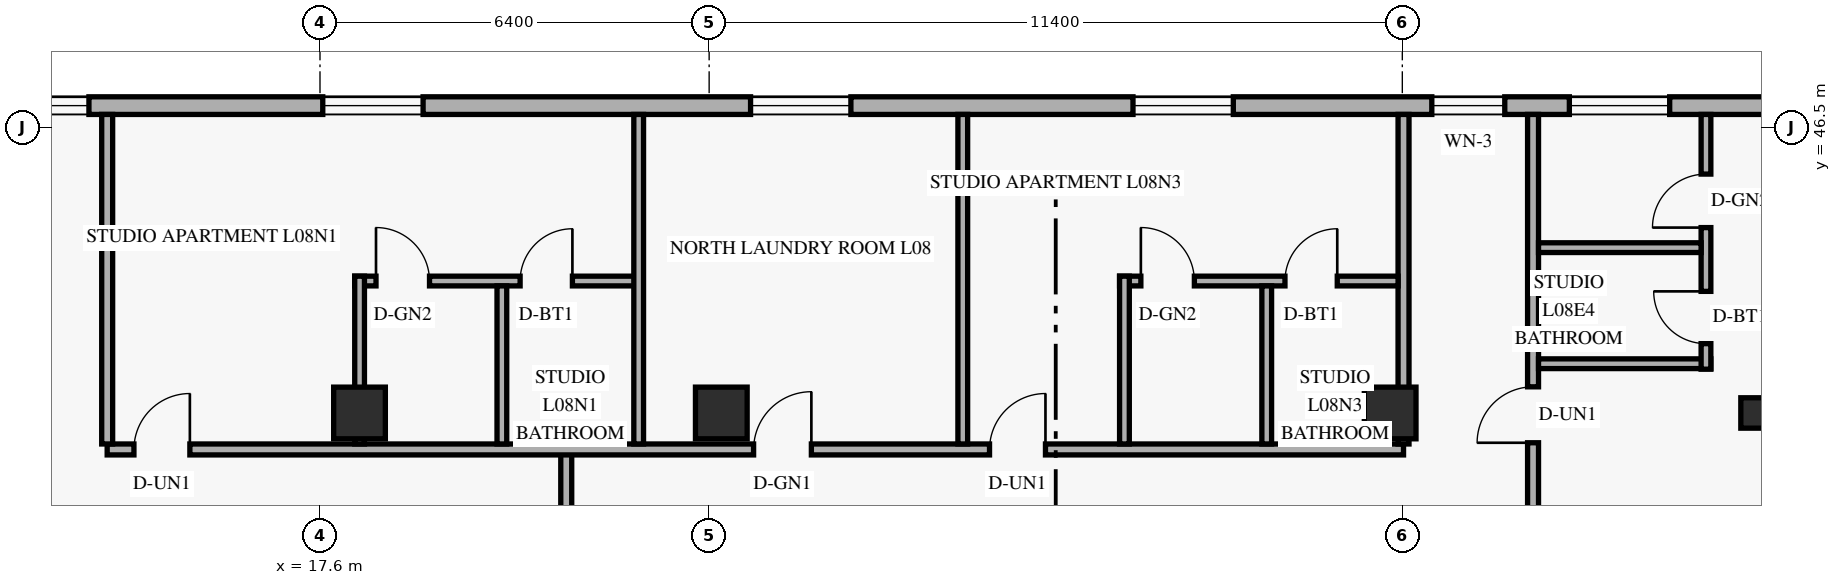
"""IFC4 building model, lengths in metres.
Left out: names, types, materials, properties, quantities, classifications, styles, units other than length and angle.
Written with IfcOpenShell. Run it as: python <this file> out.ifc"""

import sys

from ifc_helpers import new_model, si_unit, direction, frame, frame_2d, origin, origin_2d, place, context, subcontext, project, spatial, rectangle, hollow_rectangle, extrude, element, fill, save


model = new_model("IFC4")
c1 = context("Model", 3, precision=1e-05, world=origin(), true_north=direction((0.0, 1.0)))
c2 = subcontext(c1, "Body", "Model", "MODEL_VIEW")
j1 = project(units=[si_unit("LENGTHUNIT", "METRE"), si_unit("PLANEANGLEUNIT", "RADIAN")], contexts=[c1])
p1 = place(None, origin())
s1 = spatial("IfcSite", under=j1, at=p1, CompositionType="ELEMENT")
p2 = place(p1, origin())
s2 = spatial("IfcBuilding", under=s1, at=p2, CompositionType="ELEMENT")
p3 = place(p2, frame((0.0, 0.0, 34.8)))
s3 = spatial("IfcBuildingStorey", under=s2, at=p3, CompositionType="ELEMENT", Elevation=34.8)
for number, where, z_axis, x_axis in (
    (1, (18.25, 41.8, 0.0), (0.0, 0.0, 1.0), (1.0, 0.0, 0.0)),
    (2, (24.2, 41.8, 0.0), (0.0, 0.0, 1.0), (1.0, 0.0, 0.0)),
    (3, (35.2, 41.8, 0.0), (0.0, 0.0, 1.0), (1.0, 0.0, 0.0)),
):
    element("IfcColumn", number, at=place(p3, frame(where, z_axis=z_axis, x_axis=x_axis)), inside=s3, PredefinedType="COLUMN", context=c2, shape_type="SweptSolid", body=[
        extrude(rectangle(XDim=0.85, YDim=0.85, at=origin_2d()), origin(), (0.0, 0.0, 1.0), 3.6),
    ])
p4 = place(p3, frame((41.154, 41.8, 0.0), z_axis=(0.034973505036, 0.0, 0.999388239847), x_axis=(0.0, 1.0, 0.0)))
e4 = element("IfcColumn", 4, at=p4, inside=s3, PredefinedType="COLUMN", context=c2, shape_type="SweptSolid", body=[
    extrude(hollow_rectangle(XDim=0.5, YDim=0.5, WallThickness=0.022, at=origin_2d()), origin(), (0.0, 0.0, 1.0), 3.602),
])
p5 = place(p3, frame((44.98, 46.855, 0.0), z_axis=(0.0, 0.0, 1.0), x_axis=(-1.0, 0.0, 0.0)))
e5 = element("IfcWall", 5, at=p5, inside=s3, PredefinedType="SOLIDWALL", context=c2, shape_type="SweptSolid", body=[
    extrude(rectangle(XDim=39.56, YDim=0.29, at=frame_2d((19.78, 0.0))), origin(), (0.0, 0.0, 1.0), 3.36),
])
p6 = place(p5, frame((35.295, 0.0, 0.85)))
e6 = element("IfcOpeningElement", 6, at=p6, cuts=e5, PredefinedType="OPENING", context=c2, shape_type="SweptSolid", body=[
    extrude(rectangle(XDim=1.65, YDim=1.6, at=frame_2d((0.825, 0.8))), frame((0.0, 0.155, 0.0), z_axis=(0.0, -1.0, 0.0), x_axis=(1.0, 0.0, 0.0)), (0.0, 0.0, 1.0), 0.31),
])
p7 = place(p5, frame((31.18, 0.0, 0.85)))
e7 = element("IfcOpeningElement", 7, at=p7, cuts=e5, PredefinedType="OPENING", context=c2, shape_type="SweptSolid", body=[
    extrude(rectangle(XDim=1.2, YDim=1.5, at=frame_2d((0.6, 0.75))), frame((0.0, 0.155, 0.0), z_axis=(0.0, -1.0, 0.0), x_axis=(1.0, 0.0, 0.0)), (0.0, 0.0, 1.0), 0.31),
])
p8 = place(p5, frame((25.684, 0.0, 0.85)))
e8 = element("IfcOpeningElement", 8, at=p8, cuts=e5, PredefinedType="OPENING", context=c2, shape_type="SweptSolid", body=[
    extrude(rectangle(XDim=1.65, YDim=1.6, at=frame_2d((0.825, 0.8))), frame((0.0, 0.155, 0.0), z_axis=(0.0, -1.0, 0.0), x_axis=(1.0, 0.0, 0.0)), (0.0, 0.0, 1.0), 0.31),
])
p9 = place(p5, frame((18.649, 0.0, 0.85)))
e9 = element("IfcOpeningElement", 9, at=p9, cuts=e5, PredefinedType="OPENING", context=c2, shape_type="SweptSolid", body=[
    extrude(rectangle(XDim=1.65, YDim=1.6, at=frame_2d((0.825, 0.8))), frame((0.0, 0.155, 0.0), z_axis=(0.0, -1.0, 0.0), x_axis=(1.0, 0.0, 0.0)), (0.0, 0.0, 1.0), 0.31),
])
p10 = place(p5, frame((12.359, 0.0, 0.85)))
e10 = element("IfcOpeningElement", 10, at=p10, cuts=e5, PredefinedType="OPENING", context=c2, shape_type="SweptSolid", body=[
    extrude(rectangle(XDim=1.65, YDim=1.6, at=frame_2d((0.825, 0.8))), frame((0.0, 0.155, 0.0), z_axis=(0.0, -1.0, 0.0), x_axis=(1.0, 0.0, 0.0)), (0.0, 0.0, 1.0), 0.31),
])
p11 = place(p5, frame((7.895, 0.0, 0.85)))
e11 = element("IfcOpeningElement", 11, at=p11, cuts=e5, PredefinedType="OPENING", context=c2, shape_type="SweptSolid", body=[
    extrude(rectangle(XDim=1.2, YDim=1.5, at=frame_2d((0.6, 0.75))), frame((0.0, 0.155, 0.0), z_axis=(0.0, -1.0, 0.0), x_axis=(1.0, 0.0, 0.0)), (0.0, 0.0, 1.0), 0.31),
])
p12 = place(p5, frame((5.183, 0.0, 0.85)))
e12 = element("IfcOpeningElement", 12, at=p12, cuts=e5, PredefinedType="OPENING", context=c2, shape_type="SweptSolid", body=[
    extrude(rectangle(XDim=1.65, YDim=1.6, at=frame_2d((0.825, 0.8))), frame((0.0, 0.155, 0.0), z_axis=(0.0, -1.0, 0.0), x_axis=(1.0, 0.0, 0.0)), (0.0, 0.0, 1.0), 0.31),
])
p13 = place(p5, frame((1.468, 0.0, 0.85)))
e13 = element("IfcOpeningElement", 13, at=p13, cuts=e5, PredefinedType="OPENING", context=c2, shape_type="SweptSolid", body=[
    extrude(rectangle(XDim=1.65, YDim=1.6, at=frame_2d((0.825, 0.8))), frame((0.0, 0.155, 0.0), z_axis=(0.0, -1.0, 0.0), x_axis=(1.0, 0.0, 0.0)), (0.0, 0.0, 1.0), 0.31),
])
p14 = place(p3, frame((37.55, 1.29, 0.0), z_axis=(0.0, 0.0, 1.0), x_axis=(0.0, 1.0, 0.0)))
e14 = element("IfcWall", 14, at=p14, inside=s3, PredefinedType="STANDARD", context=c2, shape_type="SweptSolid", body=[
    extrude(rectangle(XDim=45.42, YDim=0.18, at=frame_2d((22.71, 0.0))), origin(), (0.0, 0.0, 1.0), 2.649),
])
p15 = place(p14, frame((4.46, 0.0, 0.0)))
e15 = element("IfcOpeningElement", 15, at=p15, cuts=e14, PredefinedType="OPENING", context=c2, shape_type="SweptSolid", body=[
    extrude(rectangle(XDim=0.92, YDim=2.15, at=frame_2d((0.46, 1.075))), frame((0.0, 0.1, 0.0), z_axis=(0.0, -1.0, 0.0), x_axis=(1.0, 0.0, 0.0)), (0.0, 0.0, 1.0), 0.2),
])
p16 = place(p14, frame((15.907, 0.0, 0.0)))
e16 = element("IfcOpeningElement", 16, at=p16, cuts=e14, PredefinedType="OPENING", context=c2, shape_type="SweptSolid", body=[
    extrude(rectangle(XDim=0.92, YDim=2.15, at=frame_2d((0.46, 1.075))), frame((0.0, 0.1, 0.0), z_axis=(0.0, -1.0, 0.0), x_axis=(1.0, 0.0, 0.0)), (0.0, 0.0, 1.0), 0.2),
])
p17 = place(p14, frame((28.23, 0.0, 0.0)))
e17 = element("IfcOpeningElement", 17, at=p17, cuts=e14, PredefinedType="OPENING", context=c2, shape_type="SweptSolid", body=[
    extrude(rectangle(XDim=0.92, YDim=2.15, at=frame_2d((0.46, 1.075))), frame((0.0, 0.1, 0.0), z_axis=(0.0, -1.0, 0.0), x_axis=(1.0, 0.0, 0.0)), (0.0, 0.0, 1.0), 0.2),
])
p18 = place(p14, frame((40.02, 0.0, 0.0)))
e18 = element("IfcOpeningElement", 18, at=p18, cuts=e14, PredefinedType="OPENING", context=c2, shape_type="SweptSolid", body=[
    extrude(rectangle(XDim=0.92, YDim=2.15, at=frame_2d((0.46, 1.075))), frame((0.0, 0.1, 0.0), z_axis=(0.0, -1.0, 0.0), x_axis=(1.0, 0.0, 0.0)), (0.0, 0.0, 1.0), 0.2),
])
p19 = place(p3, frame((21.65, 6.8, 0.0), z_axis=(0.0, 0.0, 1.0), x_axis=(0.0, 1.0, 0.0)))
e19 = element("IfcWall", 19, at=p19, inside=s3, PredefinedType="STANDARD", context=c2, shape_type="SweptSolid", body=[
    extrude(rectangle(XDim=34.4, YDim=0.18, at=frame_2d((17.2, 0.0))), origin(), (0.0, 0.0, 1.0), 2.649),
])
p20 = place(p3, frame((14.1, 41.2, 0.0), z_axis=(0.0, 0.0, 1.0), x_axis=(1.0, 0.0, 0.0)))
e20 = element("IfcWall", 20, at=p20, inside=s3, PredefinedType="STANDARD", context=c2, shape_type="SweptSolid", body=[
    extrude(rectangle(XDim=21.32, YDim=0.18, at=frame_2d((10.66, 0.0))), origin(), (0.0, 0.0, 1.0), 2.649),
])
p21 = place(p20, frame((0.44, 0.0, 0.0)))
e21 = element("IfcOpeningElement", 21, at=p21, cuts=e20, PredefinedType="OPENING", context=c2, shape_type="SweptSolid", body=[
    extrude(rectangle(XDim=0.92, YDim=2.15, at=frame_2d((0.46, 1.075))), frame((0.0, 0.1, 0.0), z_axis=(0.0, -1.0, 0.0), x_axis=(1.0, 0.0, 0.0)), (0.0, 0.0, 1.0), 0.2),
])
p22 = place(p20, frame((10.631, 0.0, 0.0)))
e22 = element("IfcOpeningElement", 22, at=p22, cuts=e20, PredefinedType="OPENING", context=c2, shape_type="SweptSolid", body=[
    extrude(rectangle(XDim=0.95, YDim=2.15, at=frame_2d((0.475, 1.075))), frame((0.0, 0.1, 0.0), z_axis=(0.0, -1.0, 0.0), x_axis=(1.0, 0.0, 0.0)), (0.0, 0.0, 1.0), 0.2),
])
p23 = place(p20, frame((14.511, 0.0, 0.0)))
e23 = element("IfcOpeningElement", 23, at=p23, cuts=e20, PredefinedType="OPENING", context=c2, shape_type="SweptSolid", body=[
    extrude(rectangle(XDim=0.92, YDim=2.15, at=frame_2d((0.46, 1.075))), frame((0.0, 0.1, 0.0), z_axis=(0.0, -1.0, 0.0), x_axis=(1.0, 0.0, 0.0)), (0.0, 0.0, 1.0), 0.2),
])
p24 = place(p3, frame((35.42, 41.29, 0.0), z_axis=(0.0, 0.0, 1.0), x_axis=(0.0, 1.0, 0.0)))
e24 = element("IfcWall", 24, at=p24, inside=s3, PredefinedType="PARTITIONING", context=c2, shape_type="SweptSolid", body=[
    extrude(rectangle(XDim=5.42, YDim=0.18, at=frame_2d((2.71, 0.0))), origin(), (0.0, 0.0, 1.0), 3.36),
])
p25 = place(p3, frame((14.1, 41.29, 0.0), z_axis=(0.0, 0.0, 1.0), x_axis=(0.0, 1.0, 0.0)))
e25 = element("IfcWall", 25, at=p25, inside=s3, PredefinedType="PARTITIONING", context=c2, shape_type="SweptSolid", body=[
    extrude(rectangle(XDim=5.42, YDim=0.18, at=frame_2d((2.71, 0.0))), origin(), (0.0, 0.0, 1.0), 2.809),
])
p26 = place(p3, frame((37.64, 42.61, 0.0), z_axis=(0.0, 0.0, 1.0), x_axis=(1.0, 0.0, 0.0)))
e26 = element("IfcWall", 26, at=p26, inside=s3, PredefinedType="PLUMBINGWALL", context=c2, shape_type="SweptSolid", body=[
    extrude(rectangle(XDim=2.834, YDim=0.16, at=frame_2d((1.417, 0.0))), origin(), (0.0, 0.0, 1.0), 3.36),
])
p27 = place(p3, frame((40.394, 42.52, 0.0), z_axis=(0.0, 0.0, 1.0), x_axis=(0.0, 1.0, 0.0)))
e27 = element("IfcWall", 27, at=p27, inside=s3, PredefinedType="PLUMBINGWALL", context=c2, shape_type="SweptSolid", body=[
    extrude(rectangle(XDim=4.19, YDim=0.16, at=frame_2d((2.095, 0.0))), origin(), (0.0, 0.0, 1.0), 3.36),
])
p28 = place(p27, frame((0.42, 0.0, 0.0)))
e28 = element("IfcOpeningElement", 28, at=p28, cuts=e27, PredefinedType="OPENING", context=c2, shape_type="SweptSolid", body=[
    extrude(rectangle(XDim=0.86, YDim=2.12, at=frame_2d((0.43, 1.06))), frame((0.0, 0.09, 0.0), z_axis=(0.0, -1.0, 0.0), x_axis=(1.0, 0.0, 0.0)), (0.0, 0.0, 1.0), 0.18),
])
p29 = place(p27, frame((2.329, 0.0, 0.0)))
e29 = element("IfcOpeningElement", 29, at=p29, cuts=e27, PredefinedType="OPENING", context=c2, shape_type="SweptSolid", body=[
    extrude(rectangle(XDim=0.88, YDim=2.12, at=frame_2d((0.44, 1.06))), frame((0.0, 0.09, 0.0), z_axis=(0.0, -1.0, 0.0), x_axis=(1.0, 0.0, 0.0)), (0.0, 0.0, 1.0), 0.18),
])
p30 = place(p3, frame((37.64, 44.519, 0.0), z_axis=(0.0, 0.0, 1.0), x_axis=(1.0, 0.0, 0.0)))
e30 = element("IfcWall", 30, at=p30, inside=s3, PredefinedType="PLUMBINGWALL", context=c2, shape_type="SweptSolid", body=[
    extrude(rectangle(XDim=2.674, YDim=0.16, at=frame_2d((1.337, 0.0))), origin(), (0.0, 0.0, 1.0), 3.36),
])
p31 = place(p3, frame((18.171, 43.97, 0.0), z_axis=(0.0, 0.0, 1.0), x_axis=(1.0, 0.0, 0.0)))
e31 = element("IfcWall", 31, at=p31, inside=s3, PredefinedType="PLUMBINGWALL", context=c2, shape_type="SweptSolid", body=[
    extrude(rectangle(XDim=4.67, YDim=0.16, at=frame_2d((2.335, 0.0))), origin(), (0.0, 0.0, 1.0), 3.36),
])
p32 = place(p31, frame((0.35, 0.0, 0.0)))
e32 = element("IfcOpeningElement", 32, at=p32, cuts=e31, PredefinedType="OPENING", context=c2, shape_type="SweptSolid", body=[
    extrude(rectangle(XDim=0.88, YDim=2.12, at=frame_2d((0.44, 1.06))), frame((0.0, 0.09, 0.0), z_axis=(0.0, -1.0, 0.0), x_axis=(1.0, 0.0, 0.0)), (0.0, 0.0, 1.0), 0.18),
])
p33 = place(p31, frame((2.72, 0.0, 0.0)))
e33 = element("IfcOpeningElement", 33, at=p33, cuts=e31, PredefinedType="OPENING", context=c2, shape_type="SweptSolid", body=[
    extrude(rectangle(XDim=0.86, YDim=2.12, at=frame_2d((0.43, 1.06))), frame((0.0, 0.09, 0.0), z_axis=(0.0, -1.0, 0.0), x_axis=(1.0, 0.0, 0.0)), (0.0, 0.0, 1.0), 0.18),
])
p34 = place(p3, frame((18.251, 41.29, 0.0), z_axis=(0.0, 0.0, 1.0), x_axis=(0.0, 1.0, 0.0)))
e34 = element("IfcWall", 34, at=p34, inside=s3, PredefinedType="PLUMBINGWALL", context=c2, shape_type="SweptSolid", body=[
    extrude(rectangle(XDim=2.76, YDim=0.16, at=frame_2d((1.38, 0.0))), origin(), (0.0, 0.0, 1.0), 2.649),
])
p35 = place(p3, frame((20.591, 41.29, 0.0), z_axis=(0.0, 0.0, 1.0), x_axis=(0.0, 1.0, 0.0)))
e35 = element("IfcWall", 35, at=p35, inside=s3, PredefinedType="PLUMBINGWALL", context=c2, shape_type="SweptSolid", body=[
    extrude(rectangle(XDim=2.6, YDim=0.16, at=frame_2d((1.3, 0.0))), origin(), (0.0, 0.0, 1.0), 2.809),
])
for number, where, z_axis, x_axis in (
    (36, (22.841, 41.29, 0.0), (0.0, 0.0, 1.0), (0.0, 1.0, 0.0)),
    (37, (28.171, 41.29, 0.0), (0.0, 0.0, 1.0), (0.0, 1.0, 0.0)),
):
    element("IfcWall", number, at=place(p3, frame(where, z_axis=z_axis, x_axis=x_axis)), inside=s3, PredefinedType="PARTITIONING", context=c2, shape_type="SweptSolid", body=[
        extrude(rectangle(XDim=5.42, YDim=0.16, at=frame_2d((2.71, 0.0))), origin(), (0.0, 0.0, 1.0), 2.809),
    ])
p36 = place(p3, frame((30.75, 43.97, 0.0), z_axis=(0.0, 0.0, 1.0), x_axis=(1.0, 0.0, 0.0)))
e38 = element("IfcWall", 38, at=p36, inside=s3, PredefinedType="PLUMBINGWALL", context=c2, shape_type="SweptSolid", body=[
    extrude(rectangle(XDim=4.58, YDim=0.16, at=frame_2d((2.29, 0.0))), origin(), (0.0, 0.0, 1.0), 3.36),
])
p37 = place(p36, frame((0.35, 0.0, 0.0)))
e39 = element("IfcOpeningElement", 39, at=p37, cuts=e38, PredefinedType="OPENING", context=c2, shape_type="SweptSolid", body=[
    extrude(rectangle(XDim=0.88, YDim=2.12, at=frame_2d((0.44, 1.06))), frame((0.0, 0.09, 0.0), z_axis=(0.0, -1.0, 0.0), x_axis=(1.0, 0.0, 0.0)), (0.0, 0.0, 1.0), 0.18),
])
p38 = place(p36, frame((2.72, 0.0, 0.0)))
e40 = element("IfcOpeningElement", 40, at=p38, cuts=e38, PredefinedType="OPENING", context=c2, shape_type="SweptSolid", body=[
    extrude(rectangle(XDim=0.86, YDim=2.12, at=frame_2d((0.43, 1.06))), frame((0.0, 0.09, 0.0), z_axis=(0.0, -1.0, 0.0), x_axis=(1.0, 0.0, 0.0)), (0.0, 0.0, 1.0), 0.18),
])
p39 = place(p3, frame((30.83, 41.29, 0.0), z_axis=(0.0, 0.0, 1.0), x_axis=(0.0, 1.0, 0.0)))
e41 = element("IfcWall", 41, at=p39, inside=s3, PredefinedType="PLUMBINGWALL", context=c2, shape_type="SweptSolid", body=[
    extrude(rectangle(XDim=2.76, YDim=0.16, at=frame_2d((1.38, 0.0))), origin(), (0.0, 0.0, 1.0), 2.809),
])
p40 = place(p3, frame((33.17, 41.29, 0.0), z_axis=(0.0, 0.0, 1.0), x_axis=(0.0, 1.0, 0.0)))
e42 = element("IfcWall", 42, at=p40, inside=s3, PredefinedType="PLUMBINGWALL", context=c2, shape_type="SweptSolid", body=[
    extrude(rectangle(XDim=2.6, YDim=0.16, at=frame_2d((1.3, 0.0))), origin(), (0.0, 0.0, 1.0), 2.809),
])
p41 = place(p7, origin())
e43 = element("IfcWindow", 43, at=p41, inside=s3, PartitioningType="SINGLE_PANEL", PredefinedType="WINDOW", context=c2, shape_type="SweptSolid", body=[
    extrude(rectangle(XDim=1.2, YDim=1.5, at=frame_2d((0.6, 0.75))), frame((0.0, 0.03, 0.0), z_axis=(0.0, -1.0, 0.0), x_axis=(1.0, 0.0, 0.0)), (0.0, 0.0, 1.0), 0.06),
])
fill(e7, e43)
p42 = place(p8, origin())
e44 = element("IfcWindow", 44, at=p42, inside=s3, PartitioningType="SINGLE_PANEL", PredefinedType="WINDOW", context=c2, shape_type="SweptSolid", body=[
    extrude(rectangle(XDim=1.65, YDim=1.6, at=frame_2d((0.825, 0.8))), frame((0.0, 0.03, 0.0), z_axis=(0.0, -1.0, 0.0), x_axis=(1.0, 0.0, 0.0)), (0.0, 0.0, 1.0), 0.06),
])
fill(e8, e44)
p43 = place(p9, origin())
e45 = element("IfcWindow", 45, at=p43, inside=s3, PartitioningType="SINGLE_PANEL", PredefinedType="WINDOW", context=c2, shape_type="SweptSolid", body=[
    extrude(rectangle(XDim=1.65, YDim=1.6, at=frame_2d((0.825, 0.8))), frame((0.0, 0.03, 0.0), z_axis=(0.0, -1.0, 0.0), x_axis=(1.0, 0.0, 0.0)), (0.0, 0.0, 1.0), 0.06),
])
fill(e9, e45)
p44 = place(p10, origin())
e46 = element("IfcWindow", 46, at=p44, inside=s3, PartitioningType="SINGLE_PANEL", PredefinedType="WINDOW", context=c2, shape_type="SweptSolid", body=[
    extrude(rectangle(XDim=1.65, YDim=1.6, at=frame_2d((0.825, 0.8))), frame((0.0, 0.03, 0.0), z_axis=(0.0, -1.0, 0.0), x_axis=(1.0, 0.0, 0.0)), (0.0, 0.0, 1.0), 0.06),
])
fill(e10, e46)
p45 = place(p11, origin())
e47 = element("IfcWindow", 47, at=p45, inside=s3, PartitioningType="SINGLE_PANEL", PredefinedType="WINDOW", context=c2, shape_type="SweptSolid", body=[
    extrude(rectangle(XDim=1.2, YDim=1.5, at=frame_2d((0.6, 0.75))), frame((0.0, 0.03, 0.0), z_axis=(0.0, -1.0, 0.0), x_axis=(1.0, 0.0, 0.0)), (0.0, 0.0, 1.0), 0.06),
])
fill(e11, e47)
p46 = place(p12, origin())
e48 = element("IfcWindow", 48, at=p46, inside=s3, PartitioningType="SINGLE_PANEL", PredefinedType="WINDOW", context=c2, shape_type="SweptSolid", body=[
    extrude(rectangle(XDim=1.65, YDim=1.6, at=frame_2d((0.825, 0.8))), frame((0.0, 0.03, 0.0), z_axis=(0.0, -1.0, 0.0), x_axis=(1.0, 0.0, 0.0)), (0.0, 0.0, 1.0), 0.06),
])
fill(e12, e48)
p47 = place(p18, origin())
e49 = element("IfcDoor", 49, at=p47, inside=s3, OperationType="SINGLE_SWING_LEFT", PredefinedType="DOOR", context=c2, shape_type="SweptSolid", body=[
    extrude(rectangle(XDim=0.92, YDim=2.15, at=frame_2d((0.46, 1.075))), frame((0.0, 0.025, 0.0), z_axis=(0.0, -1.0, 0.0), x_axis=(1.0, 0.0, 0.0)), (0.0, 0.0, 1.0), 0.05),
])
fill(e18, e49)
p48 = place(p28, origin())
e50 = element("IfcDoor", 50, at=p48, inside=s3, OperationType="SINGLE_SWING_RIGHT", PredefinedType="DOOR", context=c2, shape_type="SweptSolid", body=[
    extrude(rectangle(XDim=0.86, YDim=2.12, at=frame_2d((0.43, 1.06))), frame((0.0, 0.025, 0.0), z_axis=(0.0, -1.0, 0.0), x_axis=(1.0, 0.0, 0.0)), (0.0, 0.0, 1.0), 0.05),
])
fill(e28, e50)
p49 = place(p29, origin())
e51 = element("IfcDoor", 51, at=p49, inside=s3, OperationType="SINGLE_SWING_LEFT", PredefinedType="DOOR", context=c2, shape_type="SweptSolid", body=[
    extrude(rectangle(XDim=0.88, YDim=2.12, at=frame_2d((0.44, 1.06))), frame((0.0, 0.025, 0.0), z_axis=(0.0, -1.0, 0.0), x_axis=(1.0, 0.0, 0.0)), (0.0, 0.0, 1.0), 0.05),
])
fill(e29, e51)
p50 = place(p21, origin())
e52 = element("IfcDoor", 52, at=p50, inside=s3, OperationType="SINGLE_SWING_RIGHT", PredefinedType="DOOR", context=c2, shape_type="SweptSolid", body=[
    extrude(rectangle(XDim=0.92, YDim=2.15, at=frame_2d((0.46, 1.075))), frame((0.0, 0.025, 0.0), z_axis=(0.0, -1.0, 0.0), x_axis=(1.0, 0.0, 0.0)), (0.0, 0.0, 1.0), 0.05),
])
fill(e21, e52)
p51 = place(p32, origin())
e53 = element("IfcDoor", 53, at=p51, inside=s3, OperationType="SINGLE_SWING_LEFT", PredefinedType="DOOR", context=c2, shape_type="SweptSolid", body=[
    extrude(rectangle(XDim=0.88, YDim=2.12, at=frame_2d((0.44, 1.06))), frame((0.0, 0.025, 0.0), z_axis=(0.0, -1.0, 0.0), x_axis=(1.0, 0.0, 0.0)), (0.0, 0.0, 1.0), 0.05),
])
fill(e32, e53)
p52 = place(p33, origin())
e54 = element("IfcDoor", 54, at=p52, inside=s3, OperationType="SINGLE_SWING_RIGHT", PredefinedType="DOOR", context=c2, shape_type="SweptSolid", body=[
    extrude(rectangle(XDim=0.86, YDim=2.12, at=frame_2d((0.43, 1.06))), frame((0.0, 0.025, 0.0), z_axis=(0.0, -1.0, 0.0), x_axis=(1.0, 0.0, 0.0)), (0.0, 0.0, 1.0), 0.05),
])
fill(e33, e54)
p53 = place(p22, origin())
e55 = element("IfcDoor", 55, at=p53, inside=s3, OperationType="SINGLE_SWING_RIGHT", PredefinedType="DOOR", context=c2, shape_type="SweptSolid", body=[
    extrude(rectangle(XDim=0.95, YDim=2.15, at=frame_2d((0.475, 1.075))), frame((0.0, 0.025, 0.0), z_axis=(0.0, -1.0, 0.0), x_axis=(1.0, 0.0, 0.0)), (0.0, 0.0, 1.0), 0.05),
])
fill(e22, e55)
p54 = place(p23, origin())
e56 = element("IfcDoor", 56, at=p54, inside=s3, OperationType="SINGLE_SWING_RIGHT", PredefinedType="DOOR", context=c2, shape_type="SweptSolid", body=[
    extrude(rectangle(XDim=0.92, YDim=2.15, at=frame_2d((0.46, 1.075))), frame((0.0, 0.025, 0.0), z_axis=(0.0, -1.0, 0.0), x_axis=(1.0, 0.0, 0.0)), (0.0, 0.0, 1.0), 0.05),
])
fill(e23, e56)
p55 = place(p37, origin())
e57 = element("IfcDoor", 57, at=p55, inside=s3, OperationType="SINGLE_SWING_LEFT", PredefinedType="DOOR", context=c2, shape_type="SweptSolid", body=[
    extrude(rectangle(XDim=0.88, YDim=2.12, at=frame_2d((0.44, 1.06))), frame((0.0, 0.025, 0.0), z_axis=(0.0, -1.0, 0.0), x_axis=(1.0, 0.0, 0.0)), (0.0, 0.0, 1.0), 0.05),
])
fill(e39, e57)
p56 = place(p38, origin())
e58 = element("IfcDoor", 58, at=p56, inside=s3, OperationType="SINGLE_SWING_RIGHT", PredefinedType="DOOR", context=c2, shape_type="SweptSolid", body=[
    extrude(rectangle(XDim=0.86, YDim=2.12, at=frame_2d((0.43, 1.06))), frame((0.0, 0.025, 0.0), z_axis=(0.0, -1.0, 0.0), x_axis=(1.0, 0.0, 0.0)), (0.0, 0.0, 1.0), 0.05),
])
fill(e40, e58)
save(model, sys.argv[1])
